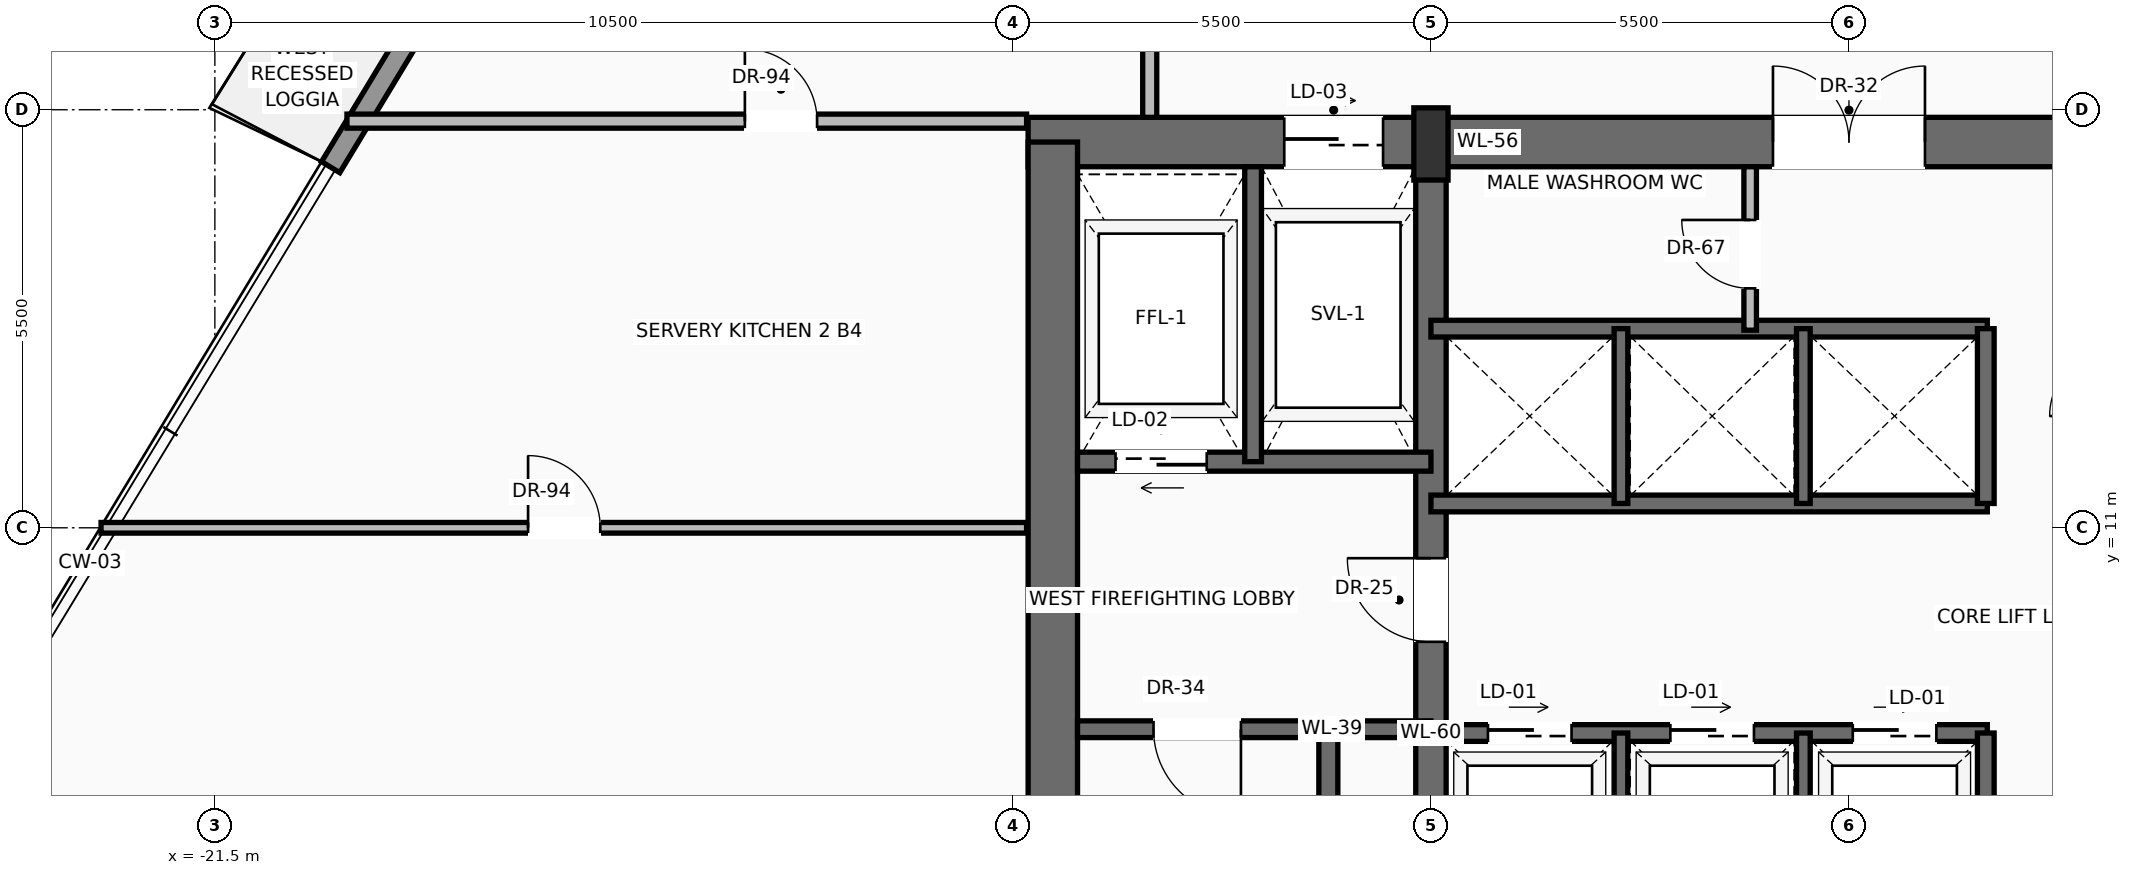
"""IFC4 building model, lengths in metres.
Left out: names, types, materials, properties, quantities, classifications, styles, units other than length and angle.
Written with IfcOpenShell. Run it as: python <this file> out.ifc"""

import sys

from ifc_helpers import new_model, si_unit, direction, frame, frame_2d, origin, origin_2d, place, context, subcontext, project, spatial, rectangle, extrude, source, transform, mapped, element, fill, save


model = new_model("IFC4")
c1 = context("Model", 3, precision=1e-05, world=origin(), true_north=direction((0.0, 1.0)))
c2 = subcontext(c1, "Body", "Model", "MODEL_VIEW")
j1 = project(units=[si_unit("LENGTHUNIT", "METRE"), si_unit("PLANEANGLEUNIT", "RADIAN")], contexts=[c1])
p1 = place(None, origin())
s1 = spatial("IfcSite", under=j1, at=p1, CompositionType="ELEMENT")
p2 = place(p1, origin())
s2 = spatial("IfcBuilding", under=s1, at=p2, CompositionType="ELEMENT")
p3 = place(p2, frame((0.0, 0.0, 211.7)))
s3 = spatial("IfcBuildingStorey", under=s2, at=p3, CompositionType="ELEMENT", Elevation=211.7)
p4 = place(p3, frame((-10.8, 16.075, 0.0), z_axis=(0.0, 0.0, 1.0), x_axis=(1.0, 0.0, 0.0)))
e1 = element("IfcWall", 1, at=p4, inside=s3, PredefinedType="SHEAR", context=c2, shape_type="SweptSolid", body=[
    extrude(rectangle(XDim=21.6, YDim=0.65, at=frame_2d((10.8, 0.0))), origin(), (0.0, 0.0, 1.0), 3.42),
])
p5 = place(p4, frame((3.37, 0.0, 0.0)))
e2 = element("IfcOpeningElement", 2, at=p5, cuts=e1, PredefinedType="OPENING", context=c2, shape_type="SweptSolid", body=[
    extrude(rectangle(XDim=1.3, YDim=2.3, at=frame_2d((0.65, 1.15))), frame((0.0, 0.335, 0.0), z_axis=(0.0, -1.0, 0.0), x_axis=(1.0, 0.0, 0.0)), (0.0, 0.0, 1.0), 0.67),
])
p6 = place(p4, frame((9.8, 0.0, 0.0)))
e3 = element("IfcOpeningElement", 3, at=p6, cuts=e1, PredefinedType="OPENING", context=c2, shape_type="SweptSolid", body=[
    extrude(rectangle(XDim=2.0, YDim=2.4, at=frame_2d((1.0, 1.2))), frame((0.0, 0.335, 0.0), z_axis=(0.0, -1.0, 0.0), x_axis=(1.0, 0.0, 0.0)), (0.0, 0.0, 1.0), 0.67),
])
p7 = place(p3, frame((-10.475, 0.525, 0.0), z_axis=(0.0, 0.0, 1.0), x_axis=(0.0, 1.0, 0.0)))
e4 = element("IfcWall", 4, at=p7, inside=s3, PredefinedType="SHEAR", context=c2, shape_type="SweptSolid", body=[
    extrude(rectangle(XDim=15.55, YDim=0.65, at=frame_2d((7.775, 0.0))), origin(), (0.0, 0.0, 1.0), 3.42),
])
p8 = place(p3, frame((-5.5, 0.525, 0.0), z_axis=(0.0, 0.0, 1.0), x_axis=(0.0, 1.0, 0.0)))
e5 = element("IfcWall", 5, at=p8, inside=s3, PredefinedType="SHEAR", context=c2, shape_type="SweptSolid", body=[
    extrude(rectangle(XDim=15.55, YDim=0.4, at=frame_2d((7.775, 0.0))), origin(), (0.0, 0.0, 1.0), 3.42),
])
p9 = place(p8, frame((8.975, 0.0, 0.0)))
e6 = element("IfcOpeningElement", 6, at=p9, cuts=e5, PredefinedType="OPENING", context=c2, shape_type="SweptSolid", body=[
    extrude(rectangle(XDim=1.1, YDim=2.2, at=frame_2d((0.55, 1.1))), frame((0.0, 0.21, 0.0), z_axis=(0.0, -1.0, 0.0), x_axis=(1.0, 0.0, 0.0)), (0.0, 0.0, 1.0), 0.42),
])
m1 = source(origin(), c2, "Body", "SweptSolid", [
    extrude(rectangle(XDim=0.45, YDim=0.95, at=origin_2d()), origin(), (0.0, 0.0, 1.0), 3.7),
])
p10 = place(p3, frame((-5.5, 16.05, 0.0), z_axis=(0.0, 0.0, 1.0), x_axis=(1.0, 0.0, 0.0)))
e7 = element("IfcColumn", 7, at=p10, inside=s3, PredefinedType="PILASTER", context=c2, shape_type="MappedRepresentation", body=[
    mapped(m1, transform((0.0, 0.0, 0.0), scale=1.0)),
])
p11 = place(p3, frame((-19.976, 15.744, 0.0), z_axis=(0.0, 0.0, 1.0), x_axis=(0.517464575924, 0.855704629334, 0.0)))
e8 = element("IfcWall", 8, at=p11, inside=s3, PredefinedType="SOLIDWALL", context=c2, shape_type="SweptSolid", body=[
    extrude(rectangle(XDim=19.208, YDim=0.28, at=frame_2d((9.604, 0.0))), origin(), (0.0, 0.0, 1.0), 3.0),
])
p12 = place(p11, frame((4.61, 0.0, 0.0)))
e9 = element("IfcOpeningElement", 9, at=p12, cuts=e8, PredefinedType="OPENING", context=c2, shape_type="SweptSolid", body=[
    extrude(rectangle(XDim=1.6, YDim=2.35, at=frame_2d((0.8, 1.175))), frame((0.0, 0.15, 0.0), z_axis=(0.0, -1.0, 0.0), x_axis=(1.0, 0.0, 0.0)), (0.0, 0.0, 1.0), 0.3),
])
p13 = place(p11, frame((13.062, 0.0, 0.9)))
e10 = element("IfcOpeningElement", 10, at=p13, cuts=e8, PredefinedType="OPENING", context=c2, shape_type="SweptSolid", body=[
    extrude(rectangle(XDim=2.0, YDim=1.85, at=frame_2d((1.0, 0.925))), frame((0.0, 0.15, 0.0), z_axis=(0.0, -1.0, 0.0), x_axis=(1.0, 0.0, 0.0)), (0.0, 0.0, 1.0), 0.3),
])
p14 = place(p3, frame((-6.85, 0.85, 0.0), z_axis=(0.0, 0.0, 1.0), x_axis=(0.0, 1.0, 0.0)))
e11 = element("IfcWall", 11, at=p14, inside=s3, PredefinedType="SOLIDWALL", context=c2, shape_type="SweptSolid", body=[
    extrude(rectangle(XDim=7.5, YDim=0.25, at=frame_2d((3.75, 0.0))), origin(), (0.0, 0.0, 1.0), 3.42),
])
p15 = place(p3, frame((-5.5, 8.35, 0.0), z_axis=(0.0, 0.0, 1.0), x_axis=(-1.0, 0.0, 0.0)))
e12 = element("IfcWall", 12, at=p15, inside=s3, PredefinedType="SOLIDWALL", context=c2, shape_type="SweptSolid", body=[
    extrude(rectangle(XDim=4.65, YDim=0.22, at=frame_2d((2.325, 0.0))), origin(), (0.0, 0.0, 1.0), 3.42),
])
p16 = place(p15, frame((2.5, 0.0, 0.0)))
e13 = element("IfcOpeningElement", 13, at=p16, cuts=e12, PredefinedType="OPENING", context=c2, shape_type="SweptSolid", body=[
    extrude(rectangle(XDim=1.15, YDim=2.2, at=frame_2d((0.575, 1.1))), frame((0.0, 0.12, 0.0), z_axis=(0.0, -1.0, 0.0), x_axis=(1.0, 0.0, 0.0)), (0.0, 0.0, 1.0), 0.24),
])
p17 = place(p3, frame((-5.5, 11.87, 0.0), z_axis=(0.0, 0.0, 1.0), x_axis=(-1.0, 0.0, 0.0)))
e14 = element("IfcWall", 14, at=p17, inside=s3, PredefinedType="SOLIDWALL", context=c2, shape_type="SweptSolid", body=[
    extrude(rectangle(XDim=4.65, YDim=0.25, at=frame_2d((2.325, 0.0))), origin(), (0.0, 0.0, 1.0), 3.42),
])
p18 = place(p17, frame((2.95, 0.0, 0.0)))
e15 = element("IfcOpeningElement", 15, at=p18, cuts=e14, PredefinedType="OPENING", context=c2, shape_type="SweptSolid", body=[
    extrude(rectangle(XDim=1.2, YDim=2.25, at=frame_2d((0.6, 1.125))), frame((0.0, 0.135, 0.0), z_axis=(0.0, -1.0, 0.0), x_axis=(1.0, 0.0, 0.0)), (0.0, 0.0, 1.0), 0.27),
])
p19 = place(p3, frame((-7.84, 11.87, 0.0), z_axis=(0.0, 0.0, 1.0), x_axis=(0.0, 1.0, 0.0)))
e16 = element("IfcWall", 16, at=p19, inside=s3, PredefinedType="SOLIDWALL", context=c2, shape_type="SweptSolid", body=[
    extrude(rectangle(XDim=3.88, YDim=0.22, at=frame_2d((1.94, 0.0))), origin(), (0.0, 0.0, 1.0), 3.42),
])
p20 = place(p3, frame((-5.5, 8.3, 0.0), z_axis=(0.0, 0.0, 1.0), x_axis=(1.0, 0.0, 0.0)))
e17 = element("IfcWall", 17, at=p20, inside=s3, PredefinedType="SOLIDWALL", context=c2, shape_type="SweptSolid", body=[
    extrude(rectangle(XDim=7.32, YDim=0.22, at=frame_2d((3.66, 0.0))), origin(), (0.0, 0.0, 1.0), 3.42),
])
p21 = place(p20, frame((0.75, 0.0, 0.0)))
e18 = element("IfcOpeningElement", 18, at=p21, cuts=e17, PredefinedType="OPENING", context=c2, shape_type="SweptSolid", body=[
    extrude(rectangle(XDim=1.1, YDim=2.2, at=frame_2d((0.55, 1.1))), frame((0.0, 0.12, 0.0), z_axis=(0.0, -1.0, 0.0), x_axis=(1.0, 0.0, 0.0)), (0.0, 0.0, 1.0), 0.24),
])
p22 = place(p20, frame((3.15, 0.0, 0.0)))
e19 = element("IfcOpeningElement", 19, at=p22, cuts=e17, PredefinedType="OPENING", context=c2, shape_type="SweptSolid", body=[
    extrude(rectangle(XDim=1.1, YDim=2.2, at=frame_2d((0.55, 1.1))), frame((0.0, 0.12, 0.0), z_axis=(0.0, -1.0, 0.0), x_axis=(1.0, 0.0, 0.0)), (0.0, 0.0, 1.0), 0.24),
])
p23 = place(p20, frame((5.55, 0.0, 0.0)))
e20 = element("IfcOpeningElement", 20, at=p23, cuts=e17, PredefinedType="OPENING", context=c2, shape_type="SweptSolid", body=[
    extrude(rectangle(XDim=1.1, YDim=2.2, at=frame_2d((0.55, 1.1))), frame((0.0, 0.12, 0.0), z_axis=(0.0, -1.0, 0.0), x_axis=(1.0, 0.0, 0.0)), (0.0, 0.0, 1.0), 0.24),
])
p24 = place(p3, frame((1.8, 6.0, 0.0), z_axis=(0.0, 0.0, 1.0), x_axis=(0.0, 1.0, 0.0)))
e21 = element("IfcWall", 21, at=p24, inside=s3, PredefinedType="SOLIDWALL", context=c2, shape_type="SweptSolid", body=[
    extrude(rectangle(XDim=2.3, YDim=0.22, at=frame_2d((1.15, 0.0))), origin(), (0.0, 0.0, 1.0), 3.42),
])
for number, where, z_axis, x_axis in (
    (22, (-3.0, 6.0, 0.0), (0.0, 0.0, 1.0), (0.0, 1.0, 0.0)),
    (23, (-0.6, 6.0, 0.0), (0.0, 0.0, 1.0), (0.0, 1.0, 0.0)),
):
    element("IfcWall", number, at=place(p3, frame(where, z_axis=z_axis, x_axis=x_axis)), inside=s3, PredefinedType="SOLIDWALL", context=c2, shape_type="SweptSolid", body=[
        extrude(rectangle(XDim=2.3, YDim=0.18, at=frame_2d((1.15, 0.0))), origin(), (0.0, 0.0, 1.0), 3.42),
    ])
for number, where, z_axis, x_axis in (
    (24, (-5.5, 11.32, 0.0), (0.0, 0.0, 1.0), (1.0, 0.0, 0.0)),
    (25, (-5.5, 13.62, 0.0), (0.0, 0.0, 1.0), (1.0, 0.0, 0.0)),
):
    element("IfcWall", number, at=place(p3, frame(where, z_axis=z_axis, x_axis=x_axis)), inside=s3, PredefinedType="SOLIDWALL", context=c2, shape_type="SweptSolid", body=[
        extrude(rectangle(XDim=7.32, YDim=0.22, at=frame_2d((3.66, 0.0))), origin(), (0.0, 0.0, 1.0), 3.42),
    ])
p25 = place(p3, frame((1.8, 11.32, 0.0), z_axis=(0.0, 0.0, 1.0), x_axis=(0.0, 1.0, 0.0)))
e26 = element("IfcWall", 26, at=p25, inside=s3, PredefinedType="SOLIDWALL", context=c2, shape_type="SweptSolid", body=[
    extrude(rectangle(XDim=2.3, YDim=0.22, at=frame_2d((1.15, 0.0))), origin(), (0.0, 0.0, 1.0), 3.42),
])
for number, where, z_axis, x_axis in (
    (27, (-3.0, 11.32, 0.0), (0.0, 0.0, 1.0), (0.0, 1.0, 0.0)),
    (28, (-0.6, 11.32, 0.0), (0.0, 0.0, 1.0), (0.0, 1.0, 0.0)),
):
    element("IfcWall", number, at=place(p3, frame(where, z_axis=z_axis, x_axis=x_axis)), inside=s3, PredefinedType="SOLIDWALL", context=c2, shape_type="SweptSolid", body=[
        extrude(rectangle(XDim=2.3, YDim=0.18, at=frame_2d((1.15, 0.0))), origin(), (0.0, 0.0, 1.0), 3.42),
    ])
p26 = place(p3, frame((-1.3, 13.6, 0.0), z_axis=(0.0, 0.0, 1.0), x_axis=(0.0, 1.0, 0.0)))
e29 = element("IfcWall", 29, at=p26, inside=s3, PredefinedType="PARTITIONING", context=c2, shape_type="SweptSolid", body=[
    extrude(rectangle(XDim=2.15, YDim=0.165, at=frame_2d((1.075, 0.0))), origin(), (0.0, 0.0, 1.0), 3.412),
])
p27 = place(p26, frame((0.55, 0.0, 0.0)))
e30 = element("IfcOpeningElement", 30, at=p27, cuts=e29, PredefinedType="OPENING", context=c2, shape_type="SweptSolid", body=[
    extrude(rectangle(XDim=0.9, YDim=2.1, at=frame_2d((0.45, 1.05))), frame((0.0, 0.093, 0.0), z_axis=(0.0, -1.0, 0.0), x_axis=(1.0, 0.0, 0.0)), (0.0, 0.0, 1.0), 0.185),
])
p28 = place(p3, frame((-9.2, 16.4, 0.0), z_axis=(0.0, 0.0, 1.0), x_axis=(0.0, 1.0, 0.0)))
e31 = element("IfcWall", 31, at=p28, inside=s3, PredefinedType="PARTITIONING", context=c2, shape_type="SweptSolid", body=[
    extrude(rectangle(XDim=7.4, YDim=0.185, at=frame_2d((3.7, 0.0))), origin(), (0.0, 0.0, 1.0), 3.412),
])
p29 = place(p28, frame((2.889, 0.0, 0.0)))
e32 = element("IfcOpeningElement", 32, at=p29, cuts=e31, PredefinedType="OPENING", context=c2, shape_type="SweptSolid", body=[
    extrude(rectangle(XDim=0.95, YDim=2.2, at=frame_2d((0.475, 1.1))), frame((0.0, 0.103, 0.0), z_axis=(0.0, -1.0, 0.0), x_axis=(1.0, 0.0, 0.0)), (0.0, 0.0, 1.0), 0.205),
])
p30 = place(p3, frame((-19.762, 16.35, 0.0), z_axis=(0.0, 0.0, 1.0), x_axis=(1.0, 0.0, 0.0)))
e33 = element("IfcWall", 33, at=p30, inside=s3, PredefinedType="PARTITIONING", context=c2, shape_type="SweptSolid", body=[
    extrude(rectangle(XDim=8.942, YDim=0.185, at=frame_2d((4.471, 0.0))), origin(), (0.0, 0.0, 1.0), 3.412),
])
p31 = place(p30, frame((5.235, 0.0, 0.0)))
e34 = element("IfcOpeningElement", 34, at=p31, cuts=e33, PredefinedType="OPENING", context=c2, shape_type="SweptSolid", body=[
    extrude(rectangle(XDim=0.95, YDim=2.2, at=frame_2d((0.475, 1.1))), frame((0.0, 0.103, 0.0), z_axis=(0.0, -1.0, 0.0), x_axis=(1.0, 0.0, 0.0)), (0.0, 0.0, 1.0), 0.205),
])
p32 = place(p3, frame((-22.997, 11.0, 0.0), z_axis=(0.0, 0.0, 1.0), x_axis=(1.0, 0.0, 0.0)))
e35 = element("IfcWall", 35, at=p32, inside=s3, PredefinedType="PARTITIONING", context=c2, shape_type="SweptSolid", body=[
    extrude(rectangle(XDim=12.177, YDim=0.14, at=frame_2d((6.089, 0.0))), origin(), (0.0, 0.0, 1.0), 3.412),
])
p33 = place(p32, frame((5.618, 0.0, 0.0)))
e36 = element("IfcOpeningElement", 36, at=p33, cuts=e35, PredefinedType="OPENING", context=c2, shape_type="SweptSolid", body=[
    extrude(rectangle(XDim=0.95, YDim=2.2, at=frame_2d((0.475, 1.1))), frame((0.0, 0.08, 0.0), z_axis=(0.0, -1.0, 0.0), x_axis=(1.0, 0.0, 0.0)), (0.0, 0.0, 1.0), 0.16),
])
m2 = source(origin(), c2, "Body", "SweptSolid", [
    extrude(rectangle(XDim=1.15, YDim=2.2, at=frame_2d((0.575, 1.1))), frame((0.0, 0.025, 0.0), z_axis=(0.0, -1.0, 0.0), x_axis=(1.0, 0.0, 0.0)), (0.0, 0.0, 1.0), 0.05),
])
p34 = place(p16, origin())
e37 = element("IfcDoor", 37, at=p34, inside=s3, OperationType="SINGLE_SWING_LEFT", PredefinedType="DOOR", context=c2, shape_type="MappedRepresentation", body=[
    mapped(m2, transform((0.0, 0.0, 0.0), scale=1.0)),
])
fill(e13, e37)
m3 = source(origin(), c2, "Body", "SweptSolid", [
    extrude(rectangle(XDim=1.1, YDim=2.2, at=frame_2d((0.55, 1.1))), frame((0.0, 0.025, 0.0), z_axis=(0.0, -1.0, 0.0), x_axis=(1.0, 0.0, 0.0)), (0.0, 0.0, 1.0), 0.05),
])
p35 = place(p9, origin())
e38 = element("IfcDoor", 38, at=p35, inside=s3, OperationType="SINGLE_SWING_RIGHT", PredefinedType="DOOR", context=c2, shape_type="MappedRepresentation", body=[
    mapped(m3, transform((0.0, 0.0, 0.0), scale=1.0)),
])
fill(e6, e38)
m4 = source(origin(), c2, "Body", "SweptSolid", [
    extrude(rectangle(XDim=1.2, YDim=2.25, at=frame_2d((0.6, 1.125))), frame((0.0, 0.025, 0.0), z_axis=(0.0, -1.0, 0.0), x_axis=(1.0, 0.0, 0.0)), (0.0, 0.0, 1.0), 0.05),
])
p36 = place(p18, origin())
e39 = element("IfcDoor", 39, at=p36, inside=s3, OperationType="SLIDING_TO_LEFT", PredefinedType="DOOR", context=c2, shape_type="MappedRepresentation", body=[
    mapped(m4, transform((0.0, 0.0, 0.0), scale=1.0)),
])
fill(e15, e39)
m5 = source(origin(), c2, "Body", "SweptSolid", [
    extrude(rectangle(XDim=1.3, YDim=2.3, at=frame_2d((0.65, 1.15))), frame((0.0, 0.025, 0.0), z_axis=(0.0, -1.0, 0.0), x_axis=(1.0, 0.0, 0.0)), (0.0, 0.0, 1.0), 0.05),
])
p37 = place(p5, origin())
e40 = element("IfcDoor", 40, at=p37, inside=s3, OperationType="SLIDING_TO_RIGHT", PredefinedType="DOOR", context=c2, shape_type="MappedRepresentation", body=[
    mapped(m5, transform((0.0, 0.0, 0.0), scale=1.0)),
])
fill(e2, e40)
m6 = source(origin(), c2, "Body", "SweptSolid", [
    extrude(rectangle(XDim=2.0, YDim=2.4, at=frame_2d((1.0, 1.2))), frame((0.0, 0.025, 0.0), z_axis=(0.0, -1.0, 0.0), x_axis=(1.0, 0.0, 0.0)), (0.0, 0.0, 1.0), 0.05),
])
p38 = place(p6, origin())
e41 = element("IfcDoor", 41, at=p38, inside=s3, OperationType="DOUBLE_DOOR_SINGLE_SWING", PredefinedType="DOOR", context=c2, shape_type="MappedRepresentation", body=[
    mapped(m6, transform((0.0, 0.0, 0.0), scale=1.0)),
])
fill(e3, e41)
m7 = source(origin(), c2, "Body", "SweptSolid", [
    extrude(rectangle(XDim=1.1, YDim=2.2, at=frame_2d((0.55, 1.1))), frame((0.0, 0.025, 0.0), z_axis=(0.0, -1.0, 0.0), x_axis=(1.0, 0.0, 0.0)), (0.0, 0.0, 1.0), 0.05),
])
p39 = place(p21, origin())
e42 = element("IfcDoor", 42, at=p39, inside=s3, OperationType="SLIDING_TO_LEFT", PredefinedType="DOOR", context=c2, shape_type="MappedRepresentation", body=[
    mapped(m7, transform((0.0, 0.0, 0.0), scale=1.0)),
])
fill(e18, e42)
p40 = place(p22, origin())
e43 = element("IfcDoor", 43, at=p40, inside=s3, OperationType="SLIDING_TO_LEFT", PredefinedType="DOOR", context=c2, shape_type="MappedRepresentation", body=[
    mapped(m7, transform((0.0, 0.0, 0.0), scale=1.0)),
])
fill(e19, e43)
p41 = place(p23, origin())
e44 = element("IfcDoor", 44, at=p41, inside=s3, OperationType="SLIDING_TO_LEFT", PredefinedType="DOOR", context=c2, shape_type="MappedRepresentation", body=[
    mapped(m7, transform((0.0, 0.0, 0.0), scale=1.0)),
])
fill(e20, e44)
m8 = source(origin(), c2, "Body", "SweptSolid", [
    extrude(rectangle(XDim=0.9, YDim=2.1, at=frame_2d((0.45, 1.05))), frame((0.0, 0.025, 0.0), z_axis=(0.0, -1.0, 0.0), x_axis=(1.0, 0.0, 0.0)), (0.0, 0.0, 1.0), 0.05),
])
p42 = place(p27, origin())
e45 = element("IfcDoor", 45, at=p42, inside=s3, OperationType="SINGLE_SWING_RIGHT", PredefinedType="DOOR", context=c2, shape_type="MappedRepresentation", body=[
    mapped(m8, transform((0.0, 0.0, 0.0), scale=1.0)),
])
fill(e30, e45)
m9 = source(origin(), c2, "Body", "SweptSolid", [
    extrude(rectangle(XDim=0.95, YDim=2.2, at=frame_2d((0.475, 1.1))), frame((0.0, 0.025, 0.0), z_axis=(0.0, -1.0, 0.0), x_axis=(1.0, 0.0, 0.0)), (0.0, 0.0, 1.0), 0.05),
])
p43 = place(p31, origin())
e46 = element("IfcDoor", 46, at=p43, inside=s3, OperationType="SINGLE_SWING_LEFT", PredefinedType="DOOR", context=c2, shape_type="MappedRepresentation", body=[
    mapped(m9, transform((0.0, 0.0, 0.0), scale=1.0)),
])
fill(e34, e46)
p44 = place(p33, origin())
e47 = element("IfcDoor", 47, at=p44, inside=s3, OperationType="SINGLE_SWING_LEFT", PredefinedType="DOOR", context=c2, shape_type="MappedRepresentation", body=[
    mapped(m9, transform((0.0, 0.0, 0.0), scale=1.0)),
])
fill(e36, e47)
save(model, sys.argv[1])
